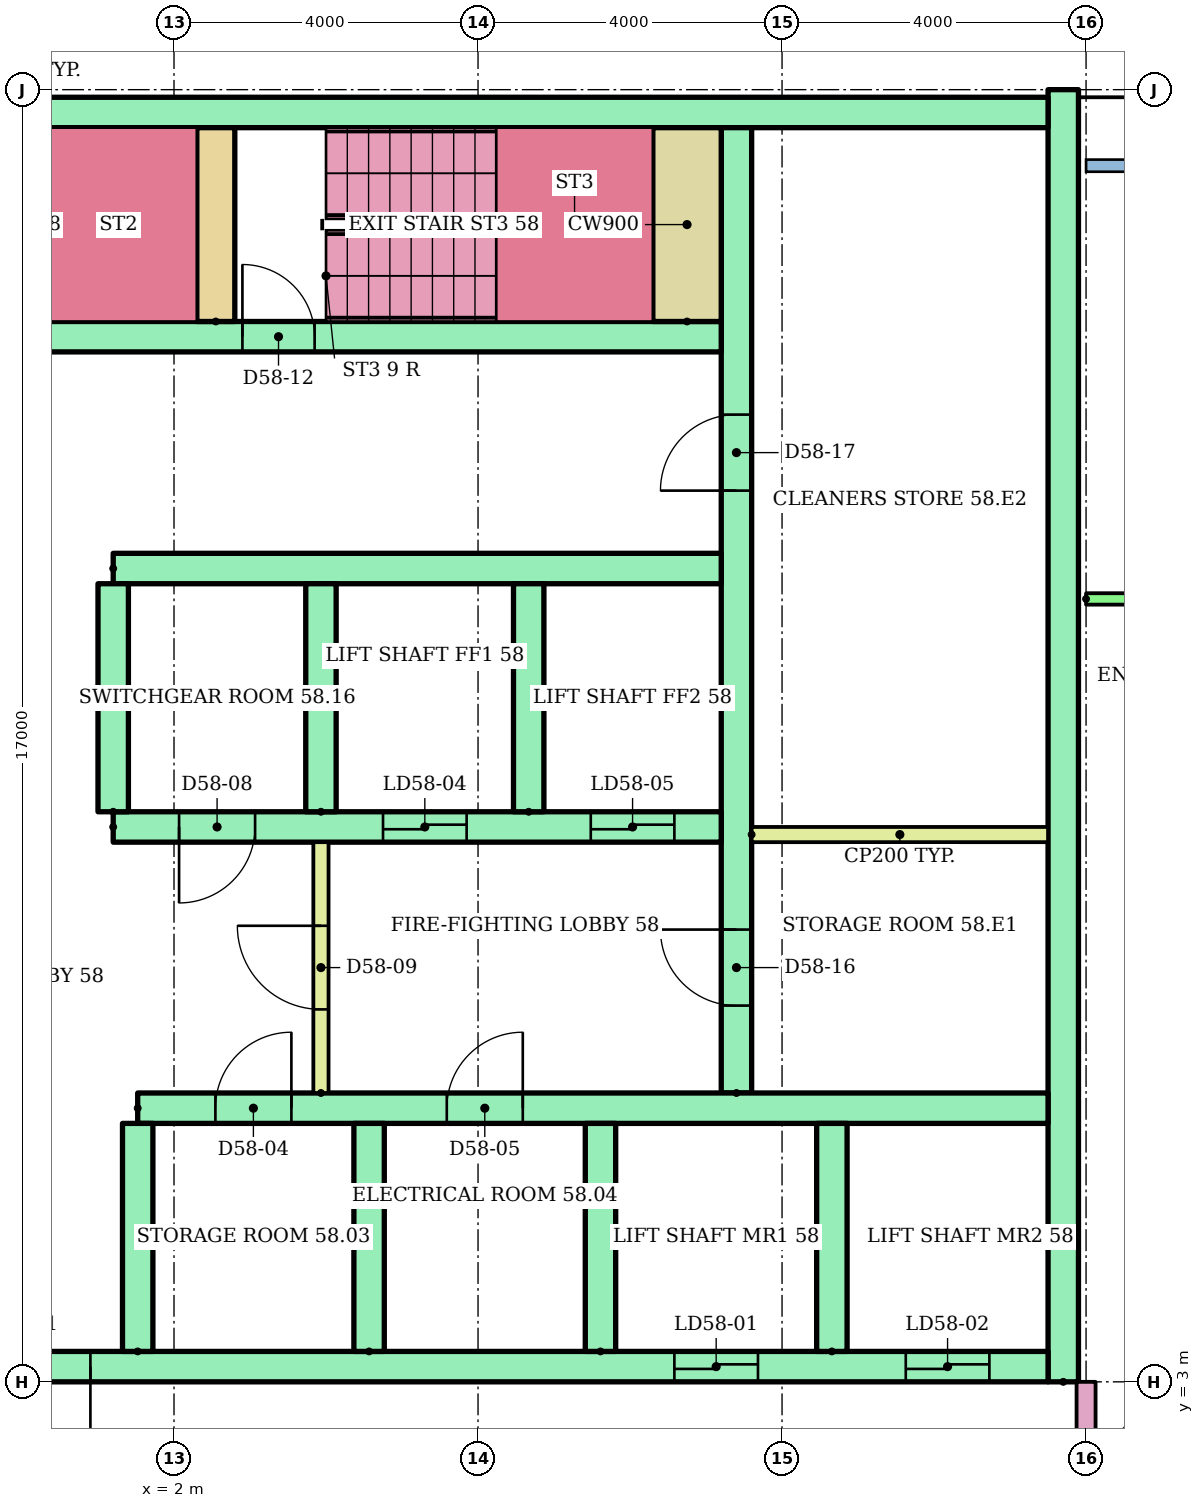
"""IFC4 building model, lengths in metres.
Left out: names, types, materials, properties, quantities, classifications, styles, units other than length and angle.
Written with IfcOpenShell. Run it as: python <this file> out.ifc"""

import sys

from ifc_helpers import new_model, si_unit, direction, frame, frame_2d, origin, place, context, subcontext, project, spatial, rectangle, extrude, element, fill, save


model = new_model("IFC4")
c1 = context("Model", 3, precision=1e-05, world=origin(), true_north=direction((0.0, 1.0)))
c2 = subcontext(c1, "Body", "Model", "MODEL_VIEW")
j1 = project(units=[si_unit("LENGTHUNIT", "METRE"), si_unit("PLANEANGLEUNIT", "RADIAN")], contexts=[c1])
p1 = place(None, origin())
s1 = spatial("IfcSite", under=j1, at=p1, CompositionType="ELEMENT")
p2 = place(p1, origin())
s2 = spatial("IfcBuilding", under=s1, at=p2, CompositionType="ELEMENT")
p3 = place(p2, frame((0.0, 0.0, 223.6)))
s3 = spatial("IfcBuildingStorey", under=s2, at=p3, CompositionType="ELEMENT", Elevation=223.6)
p4 = place(p3, frame((13.7, 3.0, 0.0), z_axis=(0.0, 0.0, 1.0), x_axis=(0.0, 1.0, 0.0)))
e1 = element("IfcWall", 1, at=p4, inside=s3, PredefinedType="SHEAR", context=c2, shape_type="SweptSolid", body=[
    extrude(rectangle(XDim=17.0, YDim=0.4, at=frame_2d((8.5, 0.0))), origin(), (0.0, 0.0, 1.0), 2.92),
])
p5 = place(p3, frame((-13.5, 19.7, 0.0)))
e2 = element("IfcWall", 2, at=p5, inside=s3, PredefinedType="SHEAR", context=c2, shape_type="SweptSolid", body=[
    extrude(rectangle(XDim=27.0, YDim=0.4, at=frame_2d((13.5, 0.0))), origin(), (0.0, 0.0, 1.0), 2.92),
])
p6 = place(p3, frame((9.4, 6.8, 0.0), z_axis=(0.0, 0.0, 1.0), x_axis=(0.0, 1.0, 0.0)))
e3 = element("IfcWall", 3, at=p6, inside=s3, PredefinedType="SHEAR", context=c2, shape_type="SweptSolid", body=[
    extrude(rectangle(XDim=12.7, YDim=0.4, at=frame_2d((6.35, 0.0))), origin(), (0.0, 0.0, 1.0), 2.92),
])
p7 = place(p6, frame((1.15, 0.0, 0.0)))
e4 = element("IfcOpeningElement", 4, at=p7, cuts=e3, PredefinedType="OPENING", context=c2, shape_type="SweptSolid", body=[
    extrude(rectangle(XDim=1.0, YDim=2.1, at=frame_2d((0.5, 1.05))), frame((0.0, 0.21, 0.0), z_axis=(0.0, -1.0, 0.0), x_axis=(1.0, 0.0, 0.0)), (0.0, 0.0, 1.0), 0.42),
])
p8 = place(p6, frame((7.925, 0.0, 0.0)))
e5 = element("IfcOpeningElement", 5, at=p8, cuts=e3, PredefinedType="OPENING", context=c2, shape_type="SweptSolid", body=[
    extrude(rectangle(XDim=1.0, YDim=2.1, at=frame_2d((0.5, 1.05))), frame((0.0, 0.21, 0.0), z_axis=(0.0, -1.0, 0.0), x_axis=(1.0, 0.0, 0.0)), (0.0, 0.0, 1.0), 0.42),
])
p9 = place(p3, frame((-13.5, 3.2, 0.0)))
e6 = element("IfcWall", 6, at=p9, inside=s3, PredefinedType="SHEAR", context=c2, shape_type="SweptSolid", body=[
    extrude(rectangle(XDim=27.0, YDim=0.4, at=frame_2d((13.5, 0.0))), origin(), (0.0, 0.0, 1.0), 2.92),
])
p10 = place(p9, frame((22.083, 0.0, 0.0)))
e7 = element("IfcOpeningElement", 7, at=p10, cuts=e6, PredefinedType="OPENING", context=c2, shape_type="SweptSolid", body=[
    extrude(rectangle(XDim=1.1, YDim=2.1, at=frame_2d((0.55, 1.05))), frame((0.0, 0.21, 0.0), z_axis=(0.0, -1.0, 0.0), x_axis=(1.0, 0.0, 0.0)), (0.0, 0.0, 1.0), 0.42),
])
p11 = place(p9, frame((25.128, 0.0, 0.0)))
e8 = element("IfcOpeningElement", 8, at=p11, cuts=e6, PredefinedType="OPENING", context=c2, shape_type="SweptSolid", body=[
    extrude(rectangle(XDim=1.1, YDim=2.1, at=frame_2d((0.55, 1.05))), frame((0.0, 0.21, 0.0), z_axis=(0.0, -1.0, 0.0), x_axis=(1.0, 0.0, 0.0)), (0.0, 0.0, 1.0), 0.42),
])
p12 = place(p9, frame((12.6, 0.0, 0.0)))
e9 = element("IfcOpeningElement", 9, at=p12, cuts=e6, PredefinedType="OPENING", context=c2, shape_type="SweptSolid", body=[
    extrude(rectangle(XDim=1.8, YDim=2.1, at=frame_2d((0.9, 1.05))), frame((0.0, 0.21, 0.0), z_axis=(0.0, -1.0, 0.0), x_axis=(1.0, 0.0, 0.0)), (0.0, 0.0, 1.0), 0.42),
])
p13 = place(p3, frame((1.522, 6.6, 0.0)))
e10 = element("IfcWall", 10, at=p13, inside=s3, PredefinedType="SHEAR", context=c2, shape_type="SweptSolid", body=[
    extrude(rectangle(XDim=11.978, YDim=0.4, at=frame_2d((5.989, 0.0))), origin(), (0.0, 0.0, 1.0), 2.92),
])
p14 = place(p13, frame((1.022, 0.0, 0.0)))
e11 = element("IfcOpeningElement", 11, at=p14, cuts=e10, PredefinedType="OPENING", context=c2, shape_type="SweptSolid", body=[
    extrude(rectangle(XDim=1.0, YDim=2.1, at=frame_2d((0.5, 1.05))), frame((0.0, 0.21, 0.0), z_axis=(0.0, -1.0, 0.0), x_axis=(1.0, 0.0, 0.0)), (0.0, 0.0, 1.0), 0.42),
])
p15 = place(p13, frame((4.067, 0.0, 0.0)))
e12 = element("IfcOpeningElement", 12, at=p15, cuts=e10, PredefinedType="OPENING", context=c2, shape_type="SweptSolid", body=[
    extrude(rectangle(XDim=1.0, YDim=2.1, at=frame_2d((0.5, 1.05))), frame((0.0, 0.21, 0.0), z_axis=(0.0, -1.0, 0.0), x_axis=(1.0, 0.0, 0.0)), (0.0, 0.0, 1.0), 0.42),
])
for number, where, z_axis, x_axis in (
    (13, (1.522, 3.4, 0.0), (0.0, 0.0, 1.0), (0.0, 1.0, 0.0)),
    (14, (4.567, 3.4, 0.0), (0.0, 0.0, 1.0), (0.0, 1.0, 0.0)),
    (15, (7.611, 3.4, 0.0), (0.0, 0.0, 1.0), (0.0, 1.0, 0.0)),
    (16, (10.656, 3.4, 0.0), (0.0, 0.0, 1.0), (0.0, 1.0, 0.0)),
):
    element("IfcWall", number, at=place(p3, frame(where, z_axis=z_axis, x_axis=x_axis)), inside=s3, PredefinedType="SHEAR", context=c2, shape_type="SweptSolid", body=[
        extrude(rectangle(XDim=3.0, YDim=0.4, at=frame_2d((1.5, 0.0))), origin(), (0.0, 0.0, 1.0), 2.92),
    ])
p16 = place(p3, frame((1.2, 10.3, 0.0)))
e17 = element("IfcWall", 17, at=p16, inside=s3, PredefinedType="SHEAR", context=c2, shape_type="SweptSolid", body=[
    extrude(rectangle(XDim=8.0, YDim=0.4, at=frame_2d((4.0, 0.0))), origin(), (0.0, 0.0, 1.0), 2.92),
])
p17 = place(p16, frame((3.55, 0.0, 0.0)))
e18 = element("IfcOpeningElement", 18, at=p17, cuts=e17, PredefinedType="OPENING", context=c2, shape_type="SweptSolid", body=[
    extrude(rectangle(XDim=1.1, YDim=2.1, at=frame_2d((0.55, 1.05))), frame((0.0, 0.21, 0.0), z_axis=(0.0, -1.0, 0.0), x_axis=(1.0, 0.0, 0.0)), (0.0, 0.0, 1.0), 0.42),
])
p18 = place(p16, frame((6.283, 0.0, 0.0)))
e19 = element("IfcOpeningElement", 19, at=p18, cuts=e17, PredefinedType="OPENING", context=c2, shape_type="SweptSolid", body=[
    extrude(rectangle(XDim=1.1, YDim=2.1, at=frame_2d((0.55, 1.05))), frame((0.0, 0.21, 0.0), z_axis=(0.0, -1.0, 0.0), x_axis=(1.0, 0.0, 0.0)), (0.0, 0.0, 1.0), 0.42),
])
p19 = place(p16, frame((0.867, 0.0, 0.0)))
e20 = element("IfcOpeningElement", 20, at=p19, cuts=e17, PredefinedType="OPENING", context=c2, shape_type="SweptSolid", body=[
    extrude(rectangle(XDim=1.0, YDim=2.1, at=frame_2d((0.5, 1.05))), frame((0.0, 0.21, 0.0), z_axis=(0.0, -1.0, 0.0), x_axis=(1.0, 0.0, 0.0)), (0.0, 0.0, 1.0), 0.42),
])
p20 = place(p3, frame((1.2, 13.7, 0.0)))
e21 = element("IfcWall", 21, at=p20, inside=s3, PredefinedType="SHEAR", context=c2, shape_type="SweptSolid", body=[
    extrude(rectangle(XDim=8.0, YDim=0.4, at=frame_2d((4.0, 0.0))), origin(), (0.0, 0.0, 1.0), 2.92),
])
for number, where, z_axis, x_axis in (
    (22, (1.2, 10.5, 0.0), (0.0, 0.0, 1.0), (0.0, 1.0, 0.0)),
    (23, (3.933, 10.5, 0.0), (0.0, 0.0, 1.0), (0.0, 1.0, 0.0)),
    (24, (6.667, 10.5, 0.0), (0.0, 0.0, 1.0), (0.0, 1.0, 0.0)),
):
    element("IfcWall", number, at=place(p3, frame(where, z_axis=z_axis, x_axis=x_axis)), inside=s3, PredefinedType="SHEAR", context=c2, shape_type="SweptSolid", body=[
        extrude(rectangle(XDim=3.0, YDim=0.4, at=frame_2d((1.5, 0.0))), origin(), (0.0, 0.0, 1.0), 2.92),
    ])
p21 = place(p3, frame((3.933, 6.8, 0.0), z_axis=(0.0, 0.0, 1.0), x_axis=(0.0, 1.0, 0.0)))
e25 = element("IfcWall", 25, at=p21, inside=s3, PredefinedType="PARTITIONING", context=c2, shape_type="SweptSolid", body=[
    extrude(rectangle(XDim=3.3, YDim=0.2, at=frame_2d((1.65, 0.0))), origin(), (0.0, 0.0, 1.0), 2.92),
])
p22 = place(p21, frame((1.1, 0.0, 0.0)))
e26 = element("IfcOpeningElement", 26, at=p22, cuts=e25, PredefinedType="OPENING", context=c2, shape_type="SweptSolid", body=[
    extrude(rectangle(XDim=1.1, YDim=2.1, at=frame_2d((0.55, 1.05))), frame((0.0, 0.11, 0.0), z_axis=(0.0, -1.0, 0.0), x_axis=(1.0, 0.0, 0.0)), (0.0, 0.0, 1.0), 0.22),
])
p23 = place(p3, frame((-9.2, 16.75, 0.0)))
e27 = element("IfcWall", 27, at=p23, inside=s3, PredefinedType="SHEAR", context=c2, shape_type="SweptSolid", body=[
    extrude(rectangle(XDim=18.4, YDim=0.4, at=frame_2d((9.2, 0.0))), origin(), (0.0, 0.0, 1.0), 2.92),
])
p24 = place(p23, frame((0.1, 0.0, 0.0)))
e28 = element("IfcOpeningElement", 28, at=p24, cuts=e27, PredefinedType="OPENING", context=c2, shape_type="SweptSolid", body=[
    extrude(rectangle(XDim=0.95, YDim=2.1, at=frame_2d((0.475, 1.05))), frame((0.0, 0.21, 0.0), z_axis=(0.0, -1.0, 0.0), x_axis=(1.0, 0.0, 0.0)), (0.0, 0.0, 1.0), 0.42),
])
p25 = place(p23, frame((6.1, 0.0, 0.0)))
e29 = element("IfcOpeningElement", 29, at=p25, cuts=e27, PredefinedType="OPENING", context=c2, shape_type="SweptSolid", body=[
    extrude(rectangle(XDim=0.95, YDim=2.1, at=frame_2d((0.475, 1.05))), frame((0.0, 0.21, 0.0), z_axis=(0.0, -1.0, 0.0), x_axis=(1.0, 0.0, 0.0)), (0.0, 0.0, 1.0), 0.42),
])
p26 = place(p23, frame((12.1, 0.0, 0.0)))
e30 = element("IfcOpeningElement", 30, at=p26, cuts=e27, PredefinedType="OPENING", context=c2, shape_type="SweptSolid", body=[
    extrude(rectangle(XDim=0.95, YDim=2.1, at=frame_2d((0.475, 1.05))), frame((0.0, 0.21, 0.0), z_axis=(0.0, -1.0, 0.0), x_axis=(1.0, 0.0, 0.0)), (0.0, 0.0, 1.0), 0.42),
])
p27 = place(p3, frame((2.55, 16.95, 0.0), z_axis=(0.0, 0.0, 1.0), x_axis=(0.0, 1.0, 0.0)))
e31 = element("IfcWall", 31, at=p27, inside=s3, PredefinedType="SHEAR", context=c2, shape_type="SweptSolid", body=[
    extrude(rectangle(XDim=2.55, YDim=0.5, at=frame_2d((1.275, 0.0))), origin(), (0.0, 0.0, 1.0), 2.92),
])
p28 = place(p3, frame((8.75, 16.95, 0.0), z_axis=(0.0, 0.0, 1.0), x_axis=(0.0, 1.0, 0.0)))
e32 = element("IfcWall", 32, at=p28, inside=s3, PredefinedType="SHEAR", context=c2, shape_type="SweptSolid", body=[
    extrude(rectangle(XDim=2.55, YDim=0.9, at=frame_2d((1.275, 0.0))), origin(), (0.0, 0.0, 1.0), 2.92),
])
p29 = place(p3, frame((9.6, 10.2, 0.0)))
e33 = element("IfcWall", 33, at=p29, inside=s3, PredefinedType="PARTITIONING", context=c2, shape_type="SweptSolid", body=[
    extrude(rectangle(XDim=3.9, YDim=0.2, at=frame_2d((1.95, 0.0))), origin(), (0.0, 0.0, 1.0), 2.92),
])
p30 = place(p3, frame((14.0, 13.3, 0.0)))
e34 = element("IfcWall", 34, at=p30, inside=s3, PredefinedType="PARTITIONING", context=c2, shape_type="SweptSolid", body=[
    extrude(rectangle(XDim=14.92, YDim=0.15, at=frame_2d((7.46, 0.0))), origin(), (0.0, 0.0, 1.0), 2.4),
])
p31 = place(p30, frame((1.55, 0.0, 0.0)))
e35 = element("IfcOpeningElement", 35, at=p31, cuts=e34, PredefinedType="OPENING", context=c2, shape_type="SweptSolid", body=[
    extrude(rectangle(XDim=0.9, YDim=2.1, at=frame_2d((0.45, 1.05))), frame((0.0, 0.085, 0.0), z_axis=(0.0, -1.0, 0.0), x_axis=(1.0, 0.0, 0.0)), (0.0, 0.0, 1.0), 0.17),
])
p32 = place(p30, frame((6.6, 0.0, 0.0)))
e36 = element("IfcOpeningElement", 36, at=p32, cuts=e34, PredefinedType="OPENING", context=c2, shape_type="SweptSolid", body=[
    extrude(rectangle(XDim=1.0, YDim=2.1, at=frame_2d((0.5, 1.05))), frame((0.0, 0.085, 0.0), z_axis=(0.0, -1.0, 0.0), x_axis=(1.0, 0.0, 0.0)), (0.0, 0.0, 1.0), 0.17),
])
p33 = place(p30, frame((12.0, 0.0, 0.0)))
e37 = element("IfcOpeningElement", 37, at=p33, cuts=e34, PredefinedType="OPENING", context=c2, shape_type="SweptSolid", body=[
    extrude(rectangle(XDim=0.9, YDim=2.1, at=frame_2d((0.45, 1.05))), frame((0.0, 0.085, 0.0), z_axis=(0.0, -1.0, 0.0), x_axis=(1.0, 0.0, 0.0)), (0.0, 0.0, 1.0), 0.17),
])
p34 = place(p3, frame((14.0, 1.4, 0.0), z_axis=(0.0, 0.0, 1.0), x_axis=(0.0, 1.0, 0.0)))
e38 = element("IfcWall", 38, at=p34, inside=s3, PredefinedType="PARTITIONING", context=c2, shape_type="SweptSolid", body=[
    extrude(rectangle(XDim=1.6, YDim=0.25, at=frame_2d((0.8, 0.0))), origin(), (0.0, 0.0, 1.0), 2.4),
])
p35 = place(p10, origin())
e39 = element("IfcDoor", 39, at=p35, inside=s3, OperationType="SLIDING_TO_LEFT", PredefinedType="DOOR", context=c2, shape_type="SweptSolid", body=[
    extrude(rectangle(XDim=1.1, YDim=2.1, at=frame_2d((0.55, 1.05))), frame((0.0, 0.025, 0.0), z_axis=(0.0, -1.0, 0.0), x_axis=(1.0, 0.0, 0.0)), (0.0, 0.0, 1.0), 0.05),
])
fill(e7, e39)
p36 = place(p11, origin())
e40 = element("IfcDoor", 40, at=p36, inside=s3, OperationType="SLIDING_TO_LEFT", PredefinedType="DOOR", context=c2, shape_type="SweptSolid", body=[
    extrude(rectangle(XDim=1.1, YDim=2.1, at=frame_2d((0.55, 1.05))), frame((0.0, 0.025, 0.0), z_axis=(0.0, -1.0, 0.0), x_axis=(1.0, 0.0, 0.0)), (0.0, 0.0, 1.0), 0.05),
])
fill(e8, e40)
p37 = place(p12, frame((1.8, 0.0, 0.0), z_axis=(0.0, 0.0, 1.0), x_axis=(-1.0, 0.0, 0.0)))
e41 = element("IfcDoor", 41, at=p37, inside=s3, OperationType="DOUBLE_DOOR_SINGLE_SWING", PredefinedType="DOOR", context=c2, shape_type="SweptSolid", body=[
    extrude(rectangle(XDim=1.8, YDim=2.1, at=frame_2d((0.9, 1.05))), frame((0.0, 0.025, 0.0), z_axis=(0.0, -1.0, 0.0), x_axis=(1.0, 0.0, 0.0)), (0.0, 0.0, 1.0), 0.05),
])
fill(e9, e41)
p38 = place(p14, origin())
e42 = element("IfcDoor", 42, at=p38, inside=s3, OperationType="SINGLE_SWING_RIGHT", PredefinedType="DOOR", context=c2, shape_type="SweptSolid", body=[
    extrude(rectangle(XDim=1.0, YDim=2.1, at=frame_2d((0.5, 1.05))), frame((0.0, 0.025, 0.0), z_axis=(0.0, -1.0, 0.0), x_axis=(1.0, 0.0, 0.0)), (0.0, 0.0, 1.0), 0.05),
])
fill(e11, e42)
p39 = place(p15, origin())
e43 = element("IfcDoor", 43, at=p39, inside=s3, OperationType="SINGLE_SWING_RIGHT", PredefinedType="DOOR", context=c2, shape_type="SweptSolid", body=[
    extrude(rectangle(XDim=1.0, YDim=2.1, at=frame_2d((0.5, 1.05))), frame((0.0, 0.025, 0.0), z_axis=(0.0, -1.0, 0.0), x_axis=(1.0, 0.0, 0.0)), (0.0, 0.0, 1.0), 0.05),
])
fill(e12, e43)
p40 = place(p17, origin())
e44 = element("IfcDoor", 44, at=p40, inside=s3, OperationType="SLIDING_TO_LEFT", PredefinedType="DOOR", context=c2, shape_type="SweptSolid", body=[
    extrude(rectangle(XDim=1.1, YDim=2.1, at=frame_2d((0.55, 1.05))), frame((0.0, 0.025, 0.0), z_axis=(0.0, -1.0, 0.0), x_axis=(1.0, 0.0, 0.0)), (0.0, 0.0, 1.0), 0.05),
])
fill(e18, e44)
p41 = place(p18, origin())
e45 = element("IfcDoor", 45, at=p41, inside=s3, OperationType="SLIDING_TO_LEFT", PredefinedType="DOOR", context=c2, shape_type="SweptSolid", body=[
    extrude(rectangle(XDim=1.1, YDim=2.1, at=frame_2d((0.55, 1.05))), frame((0.0, 0.025, 0.0), z_axis=(0.0, -1.0, 0.0), x_axis=(1.0, 0.0, 0.0)), (0.0, 0.0, 1.0), 0.05),
])
fill(e19, e45)
p42 = place(p19, frame((1.0, 0.0, 0.0), z_axis=(0.0, 0.0, 1.0), x_axis=(-1.0, 0.0, 0.0)))
e46 = element("IfcDoor", 46, at=p42, inside=s3, OperationType="SINGLE_SWING_LEFT", PredefinedType="DOOR", context=c2, shape_type="SweptSolid", body=[
    extrude(rectangle(XDim=1.0, YDim=2.1, at=frame_2d((0.5, 1.05))), frame((0.0, 0.025, 0.0), z_axis=(0.0, -1.0, 0.0), x_axis=(1.0, 0.0, 0.0)), (0.0, 0.0, 1.0), 0.05),
])
fill(e20, e46)
p43 = place(p22, origin())
e47 = element("IfcDoor", 47, at=p43, inside=s3, OperationType="SINGLE_SWING_RIGHT", PredefinedType="DOOR", context=c2, shape_type="SweptSolid", body=[
    extrude(rectangle(XDim=1.1, YDim=2.1, at=frame_2d((0.55, 1.05))), frame((0.0, 0.025, 0.0), z_axis=(0.0, -1.0, 0.0), x_axis=(1.0, 0.0, 0.0)), (0.0, 0.0, 1.0), 0.05),
])
fill(e26, e47)
p44 = place(p26, origin())
e48 = element("IfcDoor", 48, at=p44, inside=s3, OperationType="SINGLE_SWING_LEFT", PredefinedType="DOOR", context=c2, shape_type="SweptSolid", body=[
    extrude(rectangle(XDim=0.95, YDim=2.1, at=frame_2d((0.475, 1.05))), frame((0.0, 0.025, 0.0), z_axis=(0.0, -1.0, 0.0), x_axis=(1.0, 0.0, 0.0)), (0.0, 0.0, 1.0), 0.05),
])
fill(e30, e48)
p45 = place(p7, origin())
e49 = element("IfcDoor", 49, at=p45, inside=s3, OperationType="SINGLE_SWING_RIGHT", PredefinedType="DOOR", context=c2, shape_type="SweptSolid", body=[
    extrude(rectangle(XDim=1.0, YDim=2.1, at=frame_2d((0.5, 1.05))), frame((0.0, 0.025, 0.0), z_axis=(0.0, -1.0, 0.0), x_axis=(1.0, 0.0, 0.0)), (0.0, 0.0, 1.0), 0.05),
])
fill(e4, e49)
p46 = place(p8, origin())
e50 = element("IfcDoor", 50, at=p46, inside=s3, OperationType="SINGLE_SWING_LEFT", PredefinedType="DOOR", context=c2, shape_type="SweptSolid", body=[
    extrude(rectangle(XDim=1.0, YDim=2.1, at=frame_2d((0.5, 1.05))), frame((0.0, 0.025, 0.0), z_axis=(0.0, -1.0, 0.0), x_axis=(1.0, 0.0, 0.0)), (0.0, 0.0, 1.0), 0.05),
])
fill(e5, e50)
save(model, sys.argv[1])
